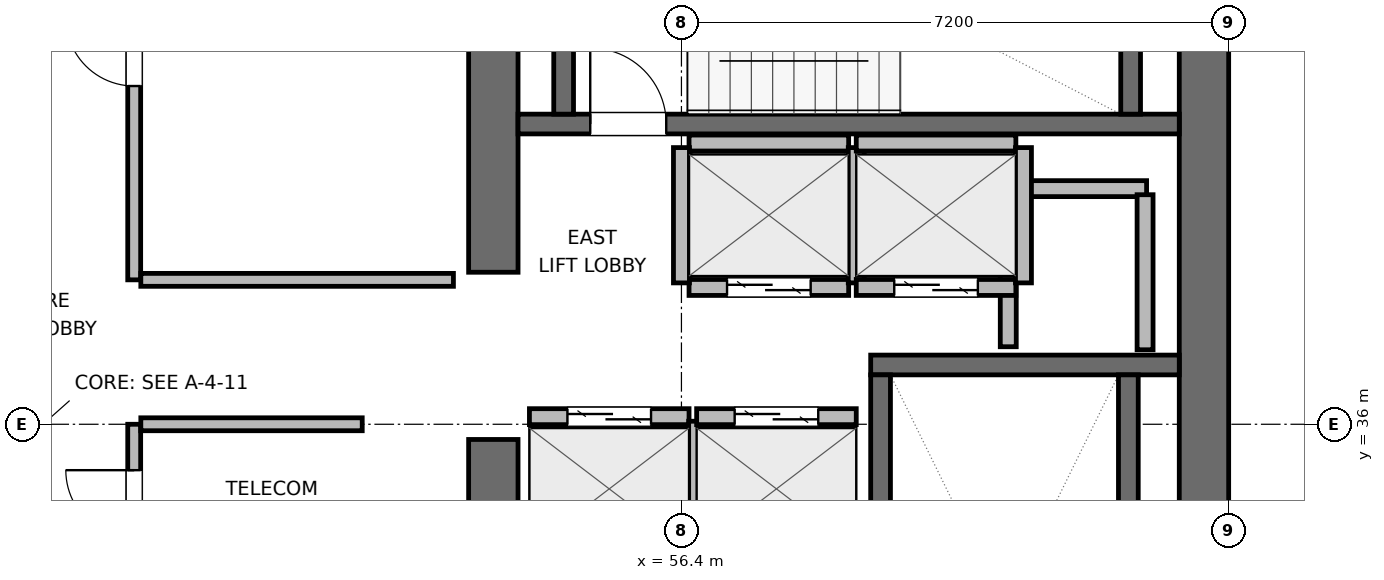
"""IFC4 building model, lengths in metres.
Left out: names, types, materials, properties, quantities, classifications, styles, units other than length and angle.
Written with IfcOpenShell. Run it as: python <this file> out.ifc"""

import sys

from ifc_helpers import new_model, si_unit, direction, frame, frame_2d, origin, place, context, subcontext, project, spatial, rectangle, extrude, element, fill, save


model = new_model("IFC4")
c1 = context("Model", 3, precision=1e-05, world=origin(), true_north=direction((0.0, 1.0)))
c2 = subcontext(c1, "Body", "Model", "MODEL_VIEW")
j1 = project(units=[si_unit("LENGTHUNIT", "METRE"), si_unit("PLANEANGLEUNIT", "RADIAN")], contexts=[c1])
p1 = place(None, origin())
s1 = spatial("IfcSite", under=j1, at=p1, CompositionType="ELEMENT")
p2 = place(p1, origin())
s2 = spatial("IfcBuilding", under=s1, at=p2, CompositionType="ELEMENT")
p3 = place(p2, frame((0.0, 0.0, 258.9)))
s3 = spatial("IfcBuildingStorey", under=s2, at=p3, CompositionType="ELEMENT", Elevation=258.9)
p4 = place(p3, frame((53.925, 27.925, 0.0), z_axis=(0.0, 0.0, 1.0), x_axis=(0.0, 1.0, 0.0)))
e1 = element("IfcWall", 1, at=p4, inside=s3, PredefinedType="SHEAR", context=c2, shape_type="SweptSolid", body=[
    extrude(rectangle(XDim=7.875, YDim=0.65, at=frame_2d((3.938, 0.0))), origin(), (0.0, 0.0, 1.0), 3.9),
])
p5 = place(p3, frame((53.925, 38.0, 0.0), z_axis=(0.0, 0.0, 1.0), x_axis=(0.0, 1.0, 0.0)))
e2 = element("IfcWall", 2, at=p5, inside=s3, PredefinedType="SHEAR", context=c2, shape_type="SweptSolid", body=[
    extrude(rectangle(XDim=6.075, YDim=0.65, at=frame_2d((3.038, 0.0))), origin(), (0.0, 0.0, 1.0), 3.9),
])
p6 = place(p3, frame((63.275, 27.6, 0.0), z_axis=(0.0, 0.0, 1.0), x_axis=(0.0, 1.0, 0.0)))
e3 = element("IfcWall", 3, at=p6, inside=s3, PredefinedType="SHEAR", context=c2, shape_type="SweptSolid", body=[
    extrude(rectangle(XDim=16.8, YDim=0.65, at=frame_2d((8.4, 0.0))), origin(), (0.0, 0.0, 1.0), 3.9),
])
p7 = place(p3, frame((58.89, 36.78, 0.0), z_axis=(0.0, 0.0, 1.0), x_axis=(1.0, 0.0, 0.0)))
e4 = element("IfcWall", 4, at=p7, inside=s3, PredefinedType="SHEAR", context=c2, shape_type="SweptSolid", body=[
    extrude(rectangle(XDim=4.06, YDim=0.26, at=frame_2d((2.03, 0.0))), origin(), (0.0, 0.0, 1.0), 3.9),
])
p8 = place(p3, frame((59.02, 29.05, 0.0), z_axis=(0.0, 0.0, 1.0), x_axis=(0.0, 1.0, 0.0)))
e5 = element("IfcWall", 5, at=p8, inside=s3, PredefinedType="SHEAR", context=c2, shape_type="SweptSolid", body=[
    extrude(rectangle(XDim=7.6, YDim=0.26, at=frame_2d((3.8, 0.0))), origin(), (0.0, 0.0, 1.0), 3.9),
])
p9 = place(p8, frame((0.3, 0.0, 0.0)))
e6 = element("IfcOpeningElement", 6, at=p9, cuts=e5, PredefinedType="OPENING", context=c2, shape_type="SweptSolid", body=[
    extrude(rectangle(XDim=1.0, YDim=2.04, at=frame_2d((0.5, 1.02))), frame((0.0, 0.14, 0.0), z_axis=(0.0, -1.0, 0.0), x_axis=(1.0, 0.0, 0.0)), (0.0, 0.0, 1.0), 0.28),
])
p10 = place(p3, frame((62.28, 29.05, 0.0), z_axis=(0.0, 0.0, 1.0), x_axis=(0.0, 1.0, 0.0)))
e7 = element("IfcWall", 7, at=p10, inside=s3, PredefinedType="SHEAR", context=c2, shape_type="SweptSolid", body=[
    extrude(rectangle(XDim=7.6, YDim=0.26, at=frame_2d((3.8, 0.0))), origin(), (0.0, 0.0, 1.0), 3.9),
])
p11 = place(p3, frame((54.25, 39.95, 0.0), z_axis=(0.0, 0.0, 1.0), x_axis=(1.0, 0.0, 0.0)))
e8 = element("IfcWall", 8, at=p11, inside=s3, PredefinedType="SHEAR", context=c2, shape_type="SweptSolid", body=[
    extrude(rectangle(XDim=8.7, YDim=0.26, at=frame_2d((4.35, 0.0))), origin(), (0.0, 0.0, 1.0), 3.9),
])
p12 = place(p11, frame((0.95, 0.0, 0.0)))
e9 = element("IfcOpeningElement", 9, at=p12, cuts=e8, PredefinedType="OPENING", context=c2, shape_type="SweptSolid", body=[
    extrude(rectangle(XDim=1.0, YDim=2.04, at=frame_2d((0.5, 1.02))), frame((0.0, 0.14, 0.0), z_axis=(0.0, -1.0, 0.0), x_axis=(1.0, 0.0, 0.0)), (0.0, 0.0, 1.0), 0.28),
])
for number, where, z_axis, x_axis in (
    (10, (54.85, 40.08, 0.0), (0.0, 0.0, 1.0), (0.0, 1.0, 0.0)),
    (11, (62.31, 40.08, 0.0), (0.0, 0.0, 1.0), (0.0, 1.0, 0.0)),
):
    element("IfcWall", number, at=place(p3, frame(where, z_axis=z_axis, x_axis=x_axis)), inside=s3, PredefinedType="SHEAR", context=c2, shape_type="SweptSolid", body=[
        extrude(rectangle(XDim=2.94, YDim=0.26, at=frame_2d((1.47, 0.0))), origin(), (0.0, 0.0, 1.0), 3.9),
    ])
p13 = place(p3, frame((60.72, 39.1, 0.0), z_axis=(0.0, 0.0, 1.0), x_axis=(1.0, 0.0, 0.0)))
e12 = element("IfcWall", 12, at=p13, inside=s3, PredefinedType="PARTITIONING", context=c2, shape_type="SweptSolid", body=[
    extrude(rectangle(XDim=1.8, YDim=0.21, at=frame_2d((0.9, 0.0))), origin(), (0.0, 0.0, 1.0), 3.68),
])
p14 = place(p3, frame((60.7, 37.02, 0.0), z_axis=(0.0, 0.0, 1.0), x_axis=(0.0, 1.0, 0.0)))
e13 = element("IfcWall", 13, at=p14, inside=s3, PredefinedType="PARTITIONING", context=c2, shape_type="SweptSolid", body=[
    extrude(rectangle(XDim=1.96, YDim=0.21, at=frame_2d((0.98, 0.0))), origin(), (0.0, 0.0, 1.0), 3.68),
])
p15 = place(p3, frame((62.5, 36.98, 0.0), z_axis=(0.0, 0.0, 1.0), x_axis=(0.0, 1.0, 0.0)))
e14 = element("IfcWall", 14, at=p15, inside=s3, PredefinedType="PARTITIONING", context=c2, shape_type="SweptSolid", body=[
    extrude(rectangle(XDim=2.04, YDim=0.21, at=frame_2d((1.02, 0.0))), origin(), (0.0, 0.0, 1.0), 3.68),
])
p16 = place(p3, frame((54.4, 36.1, 0.0), z_axis=(0.0, 0.0, 1.0), x_axis=(1.0, 0.0, 0.0)))
e15 = element("IfcWall", 15, at=p16, inside=s3, PredefinedType="PARTITIONING", context=c2, shape_type="SweptSolid", body=[
    extrude(rectangle(XDim=2.1, YDim=0.21, at=frame_2d((1.05, 0.0))), origin(), (0.0, 0.0, 1.0), 3.68),
])
p17 = place(p16, frame((0.5, 0.0, 0.0)))
e16 = element("IfcOpeningElement", 16, at=p17, cuts=e15, PredefinedType="OPENING", context=c2, shape_type="SweptSolid", body=[
    extrude(rectangle(XDim=1.1, YDim=2.04, at=frame_2d((0.55, 1.02))), frame((0.0, 0.115, 0.0), z_axis=(0.0, -1.0, 0.0), x_axis=(1.0, 0.0, 0.0)), (0.0, 0.0, 1.0), 0.23),
])
p18 = place(p3, frame((56.6, 34.26, 0.0), z_axis=(0.0, 0.0, 1.0), x_axis=(0.0, 1.0, 0.0)))
e17 = element("IfcWall", 17, at=p18, inside=s3, PredefinedType="PARTITIONING", context=c2, shape_type="SweptSolid", body=[
    extrude(rectangle(XDim=1.78, YDim=0.21, at=frame_2d((0.89, 0.0))), origin(), (0.0, 0.0, 1.0), 3.68),
])
p19 = place(p3, frame((56.6, 36.1, 0.0), z_axis=(0.0, 0.0, 1.0), x_axis=(1.0, 0.0, 0.0)))
e18 = element("IfcWall", 18, at=p19, inside=s3, PredefinedType="PARTITIONING", context=c2, shape_type="SweptSolid", body=[
    extrude(rectangle(XDim=2.1, YDim=0.21, at=frame_2d((1.05, 0.0))), origin(), (0.0, 0.0, 1.0), 3.68),
])
p20 = place(p19, frame((0.5, 0.0, 0.0)))
e19 = element("IfcOpeningElement", 19, at=p20, cuts=e18, PredefinedType="OPENING", context=c2, shape_type="SweptSolid", body=[
    extrude(rectangle(XDim=1.1, YDim=2.04, at=frame_2d((0.55, 1.02))), frame((0.0, 0.115, 0.0), z_axis=(0.0, -1.0, 0.0), x_axis=(1.0, 0.0, 0.0)), (0.0, 0.0, 1.0), 0.23),
])
p21 = place(p3, frame((56.5, 37.8, 0.0), z_axis=(0.0, 0.0, 1.0), x_axis=(1.0, 0.0, 0.0)))
e20 = element("IfcWall", 20, at=p21, inside=s3, PredefinedType="PARTITIONING", context=c2, shape_type="SweptSolid", body=[
    extrude(rectangle(XDim=2.1, YDim=0.21, at=frame_2d((1.05, 0.0))), origin(), (0.0, 0.0, 1.0), 3.68),
])
p22 = place(p21, frame((0.5, 0.0, 0.0)))
e21 = element("IfcOpeningElement", 21, at=p22, cuts=e20, PredefinedType="OPENING", context=c2, shape_type="SweptSolid", body=[
    extrude(rectangle(XDim=1.1, YDim=2.04, at=frame_2d((0.55, 1.02))), frame((0.0, 0.115, 0.0), z_axis=(0.0, -1.0, 0.0), x_axis=(1.0, 0.0, 0.0)), (0.0, 0.0, 1.0), 0.23),
])
p23 = place(p3, frame((56.5, 39.7, 0.0), z_axis=(0.0, 0.0, 1.0), x_axis=(1.0, 0.0, 0.0)))
e22 = element("IfcWall", 22, at=p23, inside=s3, PredefinedType="PARTITIONING", context=c2, shape_type="SweptSolid", body=[
    extrude(rectangle(XDim=2.1, YDim=0.21, at=frame_2d((1.05, 0.0))), origin(), (0.0, 0.0, 1.0), 3.68),
])
for number, where, z_axis, x_axis in (
    (23, (56.4, 37.86, 0.0), (0.0, 0.0, 1.0), (0.0, 1.0, 0.0)),
    (24, (58.7, 37.86, 0.0), (0.0, 0.0, 1.0), (0.0, 1.0, 0.0)),
):
    element("IfcWall", number, at=place(p3, frame(where, z_axis=z_axis, x_axis=x_axis)), inside=s3, PredefinedType="PARTITIONING", context=c2, shape_type="SweptSolid", body=[
        extrude(rectangle(XDim=1.78, YDim=0.21, at=frame_2d((0.89, 0.0))), origin(), (0.0, 0.0, 1.0), 3.68),
    ])
p24 = place(p3, frame((58.7, 37.8, 0.0), z_axis=(0.0, 0.0, 1.0), x_axis=(1.0, 0.0, 0.0)))
e25 = element("IfcWall", 25, at=p24, inside=s3, PredefinedType="PARTITIONING", context=c2, shape_type="SweptSolid", body=[
    extrude(rectangle(XDim=2.1, YDim=0.21, at=frame_2d((1.05, 0.0))), origin(), (0.0, 0.0, 1.0), 3.68),
])
p25 = place(p24, frame((0.5, 0.0, 0.0)))
e26 = element("IfcOpeningElement", 26, at=p25, cuts=e25, PredefinedType="OPENING", context=c2, shape_type="SweptSolid", body=[
    extrude(rectangle(XDim=1.1, YDim=2.04, at=frame_2d((0.55, 1.02))), frame((0.0, 0.115, 0.0), z_axis=(0.0, -1.0, 0.0), x_axis=(1.0, 0.0, 0.0)), (0.0, 0.0, 1.0), 0.23),
])
p26 = place(p3, frame((58.7, 39.7, 0.0), z_axis=(0.0, 0.0, 1.0), x_axis=(1.0, 0.0, 0.0)))
e27 = element("IfcWall", 27, at=p26, inside=s3, PredefinedType="PARTITIONING", context=c2, shape_type="SweptSolid", body=[
    extrude(rectangle(XDim=2.1, YDim=0.21, at=frame_2d((1.05, 0.0))), origin(), (0.0, 0.0, 1.0), 3.68),
])
p27 = place(p3, frame((60.9, 37.86, 0.0), z_axis=(0.0, 0.0, 1.0), x_axis=(0.0, 1.0, 0.0)))
e28 = element("IfcWall", 28, at=p27, inside=s3, PredefinedType="PARTITIONING", context=c2, shape_type="SweptSolid", body=[
    extrude(rectangle(XDim=1.78, YDim=0.21, at=frame_2d((0.89, 0.0))), origin(), (0.0, 0.0, 1.0), 3.68),
])
p28 = place(p3, frame((49.2, 32.6, 0.0), z_axis=(0.0, 0.0, 1.0), x_axis=(0.0, 1.0, 0.0)))
e29 = element("IfcWall", 29, at=p28, inside=s3, PredefinedType="PARTITIONING", context=c2, shape_type="SweptSolid", body=[
    extrude(rectangle(XDim=3.4, YDim=0.17, at=frame_2d((1.7, 0.0))), origin(), (0.0, 0.0, 1.0), 3.68),
])
p29 = place(p28, frame((0.196, 0.0, 0.0)))
e30 = element("IfcOpeningElement", 30, at=p29, cuts=e29, PredefinedType="OPENING", context=c2, shape_type="SweptSolid", body=[
    extrude(rectangle(XDim=0.9, YDim=2.02, at=frame_2d((0.45, 1.01))), frame((0.0, 0.095, 0.0), z_axis=(0.0, -1.0, 0.0), x_axis=(1.0, 0.0, 0.0)), (0.0, 0.0, 1.0), 0.19),
])
p30 = place(p28, frame((1.896, 0.0, 0.0)))
e31 = element("IfcOpeningElement", 31, at=p30, cuts=e29, PredefinedType="OPENING", context=c2, shape_type="SweptSolid", body=[
    extrude(rectangle(XDim=0.9, YDim=2.02, at=frame_2d((0.45, 1.01))), frame((0.0, 0.095, 0.0), z_axis=(0.0, -1.0, 0.0), x_axis=(1.0, 0.0, 0.0)), (0.0, 0.0, 1.0), 0.19),
])
p31 = place(p3, frame((49.287, 36.0, 0.0), z_axis=(0.0, 0.0, 1.0), x_axis=(1.0, 0.0, 0.0)))
e32 = element("IfcWall", 32, at=p31, inside=s3, PredefinedType="PARTITIONING", context=c2, shape_type="SweptSolid", body=[
    extrude(rectangle(XDim=2.913, YDim=0.17, at=frame_2d((1.457, 0.0))), origin(), (0.0, 0.0, 1.0), 3.68),
])
p32 = place(p3, frame((49.2, 37.9, 0.0), z_axis=(0.0, 0.0, 1.0), x_axis=(0.0, 1.0, 0.0)))
e33 = element("IfcWall", 33, at=p32, inside=s3, PredefinedType="PARTITIONING", context=c2, shape_type="SweptSolid", body=[
    extrude(rectangle(XDim=6.0, YDim=0.17, at=frame_2d((3.0, 0.0))), origin(), (0.0, 0.0, 1.0), 3.68),
])
p33 = place(p32, frame((2.55, 0.0, 0.0)))
e34 = element("IfcOpeningElement", 34, at=p33, cuts=e33, PredefinedType="OPENING", context=c2, shape_type="SweptSolid", body=[
    extrude(rectangle(XDim=0.9, YDim=2.02, at=frame_2d((0.45, 1.01))), frame((0.0, 0.095, 0.0), z_axis=(0.0, -1.0, 0.0), x_axis=(1.0, 0.0, 0.0)), (0.0, 0.0, 1.0), 0.19),
])
p34 = place(p3, frame((49.287, 37.9, 0.0), z_axis=(0.0, 0.0, 1.0), x_axis=(1.0, 0.0, 0.0)))
e35 = element("IfcWall", 35, at=p34, inside=s3, PredefinedType="PARTITIONING", context=c2, shape_type="SweptSolid", body=[
    extrude(rectangle(XDim=4.113, YDim=0.17, at=frame_2d((2.056, 0.0))), origin(), (0.0, 0.0, 1.0), 3.68),
])
p35 = place(p12, origin())
e36 = element("IfcDoor", 36, at=p35, inside=s3, OperationType="SINGLE_SWING_LEFT", PredefinedType="DOOR", context=c2, shape_type="SweptSolid", body=[
    extrude(rectangle(XDim=1.0, YDim=2.04, at=frame_2d((0.5, 1.02))), frame((0.0, 0.025, 0.0), z_axis=(0.0, -1.0, 0.0), x_axis=(1.0, 0.0, 0.0)), (0.0, 0.0, 1.0), 0.05),
])
fill(e9, e36)
p36 = place(p17, origin())
e37 = element("IfcDoor", 37, at=p36, inside=s3, OperationType="DOUBLE_DOOR_SLIDING", PredefinedType="DOOR", context=c2, shape_type="SweptSolid", body=[
    extrude(rectangle(XDim=1.1, YDim=2.04, at=frame_2d((0.55, 1.02))), frame((0.0, 0.025, 0.0), z_axis=(0.0, -1.0, 0.0), x_axis=(1.0, 0.0, 0.0)), (0.0, 0.0, 1.0), 0.05),
])
fill(e16, e37)
p37 = place(p20, origin())
e38 = element("IfcDoor", 38, at=p37, inside=s3, OperationType="DOUBLE_DOOR_SLIDING", PredefinedType="DOOR", context=c2, shape_type="SweptSolid", body=[
    extrude(rectangle(XDim=1.1, YDim=2.04, at=frame_2d((0.55, 1.02))), frame((0.0, 0.025, 0.0), z_axis=(0.0, -1.0, 0.0), x_axis=(1.0, 0.0, 0.0)), (0.0, 0.0, 1.0), 0.05),
])
fill(e19, e38)
p38 = place(p22, origin())
e39 = element("IfcDoor", 39, at=p38, inside=s3, OperationType="DOUBLE_DOOR_SLIDING", PredefinedType="DOOR", context=c2, shape_type="SweptSolid", body=[
    extrude(rectangle(XDim=1.1, YDim=2.04, at=frame_2d((0.55, 1.02))), frame((0.0, 0.025, 0.0), z_axis=(0.0, -1.0, 0.0), x_axis=(1.0, 0.0, 0.0)), (0.0, 0.0, 1.0), 0.05),
])
fill(e21, e39)
p39 = place(p25, origin())
e40 = element("IfcDoor", 40, at=p39, inside=s3, OperationType="DOUBLE_DOOR_SLIDING", PredefinedType="DOOR", context=c2, shape_type="SweptSolid", body=[
    extrude(rectangle(XDim=1.1, YDim=2.04, at=frame_2d((0.55, 1.02))), frame((0.0, 0.025, 0.0), z_axis=(0.0, -1.0, 0.0), x_axis=(1.0, 0.0, 0.0)), (0.0, 0.0, 1.0), 0.05),
])
fill(e26, e40)
p40 = place(p30, origin())
e41 = element("IfcDoor", 41, at=p40, inside=s3, OperationType="SINGLE_SWING_RIGHT", PredefinedType="DOOR", context=c2, shape_type="SweptSolid", body=[
    extrude(rectangle(XDim=0.9, YDim=2.02, at=frame_2d((0.45, 1.01))), frame((0.0, 0.025, 0.0), z_axis=(0.0, -1.0, 0.0), x_axis=(1.0, 0.0, 0.0)), (0.0, 0.0, 1.0), 0.05),
])
fill(e31, e41)
p41 = place(p33, origin())
e42 = element("IfcDoor", 42, at=p41, inside=s3, OperationType="SINGLE_SWING_RIGHT", PredefinedType="DOOR", context=c2, shape_type="SweptSolid", body=[
    extrude(rectangle(XDim=0.9, YDim=2.02, at=frame_2d((0.45, 1.01))), frame((0.0, 0.025, 0.0), z_axis=(0.0, -1.0, 0.0), x_axis=(1.0, 0.0, 0.0)), (0.0, 0.0, 1.0), 0.05),
])
fill(e34, e42)
save(model, sys.argv[1])
